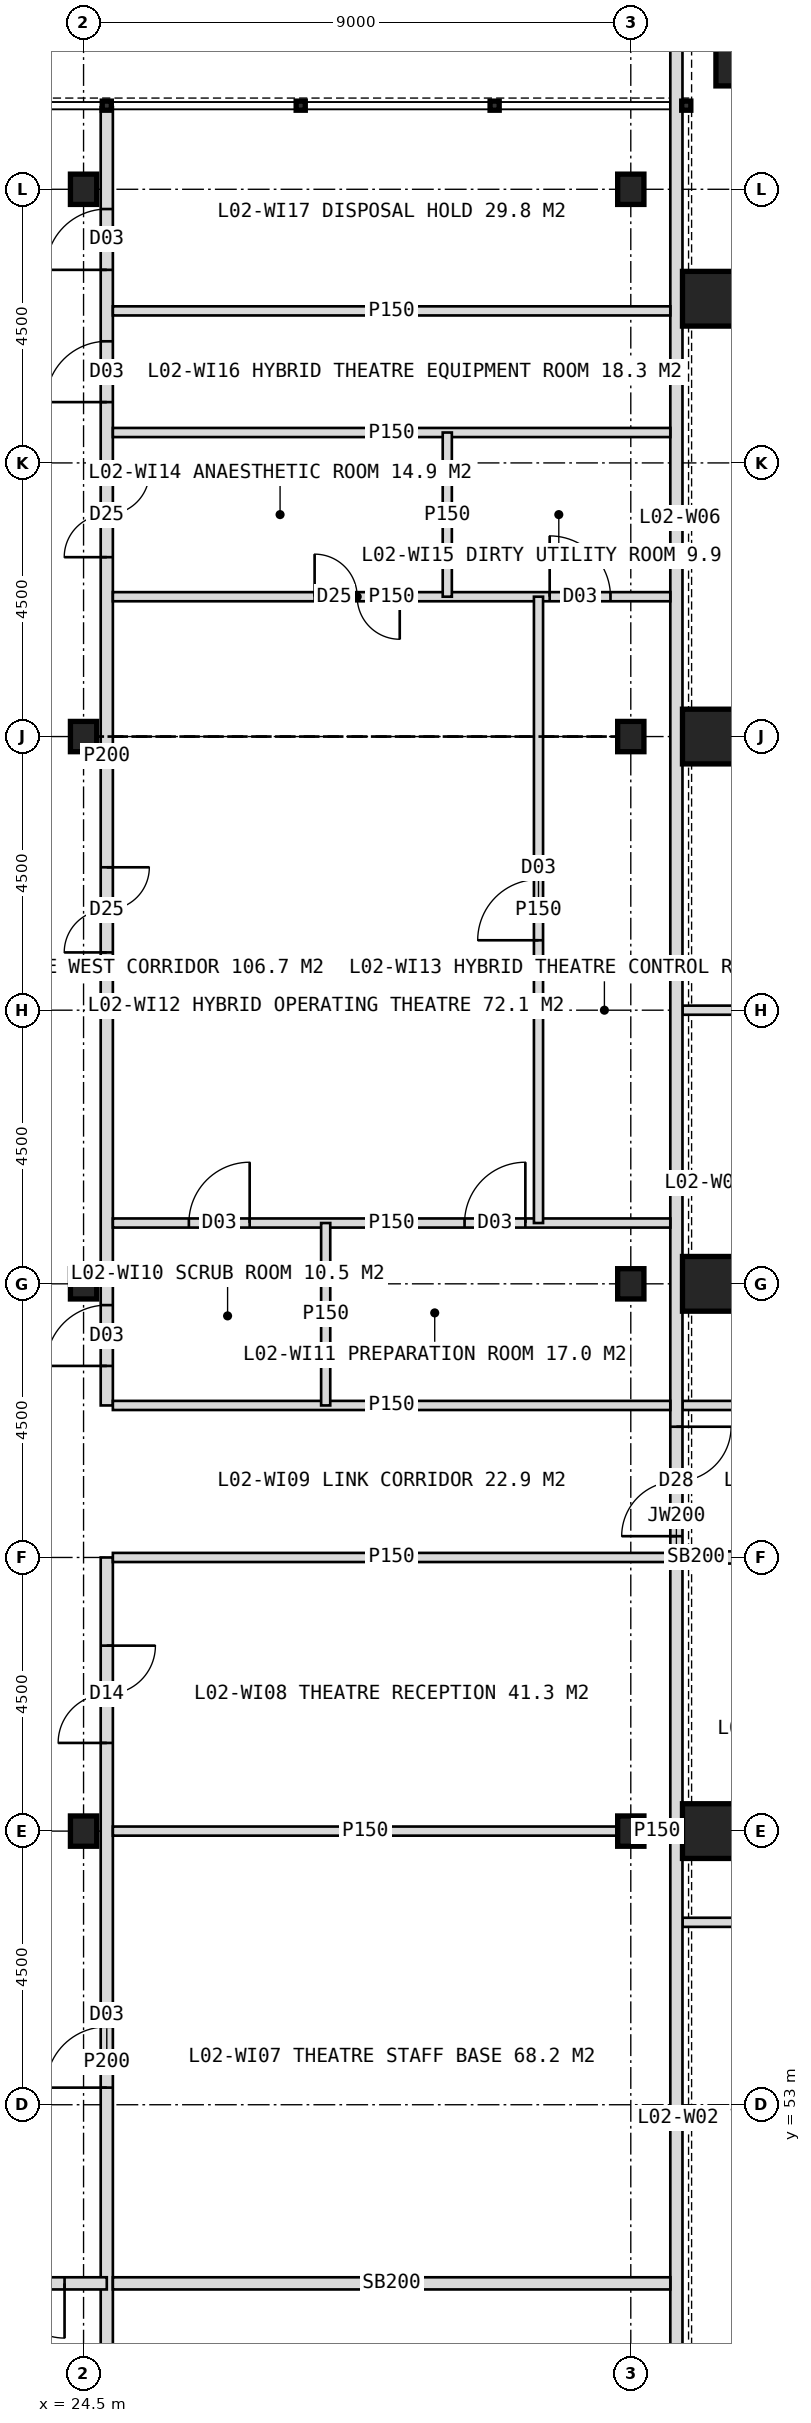
"""IFC4 building model, lengths in metres.
Left out: names, types, materials, properties, quantities, classifications, styles, units other than length and angle.
Written with IfcOpenShell. Run it as: python <this file> out.ifc"""

import sys

from ifc_helpers import new_model, si_unit, direction, frame, frame_2d, origin, origin_2d, place, context, subcontext, project, spatial, rectangle, hollow_rectangle, i_section, extrude, element, fill, save


model = new_model("IFC4")
c1 = context("Model", 3, precision=1e-05, world=origin(), true_north=direction((0.0, 1.0)))
c2 = subcontext(c1, "Body", "Model", "MODEL_VIEW")
j1 = project(units=[si_unit("LENGTHUNIT", "METRE"), si_unit("PLANEANGLEUNIT", "RADIAN")], contexts=[c1])
p1 = place(None, origin())
s1 = spatial("IfcSite", under=j1, at=p1, CompositionType="ELEMENT")
p2 = place(p1, origin())
s2 = spatial("IfcBuilding", under=s1, at=p2, CompositionType="ELEMENT")
p3 = place(p2, frame((0.0, 0.0, 11.0)))
s3 = spatial("IfcBuildingStorey", under=s2, at=p3, CompositionType="ELEMENT", Elevation=11.0)
for number, where, z_axis, x_axis in (
    (1, (34.8, 57.5, 0.0), (0.0, 0.0, 1.0), (1.0, 0.0, 0.0)),
    (2, (34.8, 66.5, 0.0), (0.0, 0.0, 1.0), (1.0, 0.0, 0.0)),
    (3, (34.8, 75.5, 0.0), (0.0, 0.0, 1.0), (1.0, 0.0, 0.0)),
    (4, (34.8, 82.7, 0.0), (0.0, 0.0, 1.0), (1.0, 0.0, 0.0)),
    (5, (35.35, 86.65, 0.0), (0.0, 0.0, 1.0), (1.0, 0.0, 0.0)),
):
    element("IfcColumn", number, at=place(p3, frame(where, z_axis=z_axis, x_axis=x_axis)), inside=s3, PredefinedType="COLUMN", context=c2, shape_type="SweptSolid", body=[
        extrude(hollow_rectangle(XDim=0.9, YDim=0.9, WallThickness=0.08, at=origin_2d()), origin(), (0.0, 0.0, 1.0), 5.5),
    ])
for number, where, z_axis, x_axis in (
    (6, (24.5, 57.5, 0.0), (0.0, 0.0, 1.0), (1.0, 0.0, 0.0)),
    (7, (24.5, 66.5, 0.0), (0.0, 0.0, 1.0), (1.0, 0.0, 0.0)),
    (8, (24.5, 75.5, 0.0), (0.0, 0.0, 1.0), (1.0, 0.0, 0.0)),
    (9, (24.5, 84.5, 0.0), (0.0, 0.0, 1.0), (1.0, 0.0, 0.0)),
    (10, (33.5, 57.5, 0.0), (0.0, 0.0, 1.0), (1.0, 0.0, 0.0)),
    (11, (33.5, 66.5, 0.0), (0.0, 0.0, 1.0), (1.0, 0.0, 0.0)),
    (12, (33.5, 75.5, 0.0), (0.0, 0.0, 1.0), (1.0, 0.0, 0.0)),
    (13, (33.5, 84.5, 0.0), (0.0, 0.0, 1.0), (1.0, 0.0, 0.0)),
):
    element("IfcColumn", number, at=place(p3, frame(where, z_axis=z_axis, x_axis=x_axis)), inside=s3, PredefinedType="COLUMN", context=c2, shape_type="SweptSolid", body=[
        extrude(i_section(OverallWidth=0.432, OverallDepth=0.498, WebThickness=0.056, FlangeThickness=0.089, FilletRadius=0.015, at=origin_2d()), origin(), (0.0, 0.0, 1.0), 5.5),
    ])
p4 = place(p3, frame((40.5, 56.0, 0.0), z_axis=(0.0, 0.0, 1.0), x_axis=(-1.0, 0.0, 0.0)))
e14 = element("IfcWall", 14, at=p4, inside=s3, PredefinedType="PARTITIONING", context=c2, shape_type="SweptSolid", body=[
    extrude(rectangle(XDim=6.15, YDim=0.15, at=frame_2d((3.075, 0.0))), origin(), (0.0, 0.0, 1.0), 5.2),
])
p5 = place(p3, frame((40.5, 62.0, 0.0), z_axis=(0.0, 0.0, 1.0), x_axis=(-1.0, 0.0, 0.0)))
e15 = element("IfcWall", 15, at=p5, inside=s3, PredefinedType="SOLIDWALL", context=c2, shape_type="SweptSolid", body=[
    extrude(rectangle(XDim=5.7, YDim=0.2, at=frame_2d((2.85, 0.0))), origin(), (0.0, 0.0, 1.0), 4.4),
])
p6 = place(p3, frame((34.8, 62.0, 0.0), z_axis=(0.0, 0.0, 1.0), x_axis=(-1.0, 0.0, 0.0)))
e16 = element("IfcWall", 16, at=p6, inside=s3, PredefinedType="SOLIDWALL", context=c2, shape_type="SweptSolid", body=[
    extrude(rectangle(XDim=0.45, YDim=0.2, at=frame_2d((0.225, 0.0))), origin(), (0.0, 0.0, 1.0), 5.2),
])
for number, where, z_axis, x_axis in (
    (17, (40.5, 64.5, 0.0), (0.0, 0.0, 1.0), (-1.0, 0.0, 0.0)),
    (18, (40.5, 71.0, 0.0), (0.0, 0.0, 1.0), (-1.0, 0.0, 0.0)),
):
    element("IfcWall", number, at=place(p3, frame(where, z_axis=z_axis, x_axis=x_axis)), inside=s3, PredefinedType="PARTITIONING", context=c2, shape_type="SweptSolid", body=[
        extrude(rectangle(XDim=6.15, YDim=0.15, at=frame_2d((3.075, 0.0))), origin(), (0.0, 0.0, 1.0), 5.2),
    ])
p7 = place(p3, frame((24.882, 45.4, 0.0), z_axis=(0.0, 0.0, 1.0), x_axis=(0.0, 1.0, 0.0)))
e19 = element("IfcWall", 19, at=p7, inside=s3, PredefinedType="PARTITIONING", context=c2, shape_type="SweptSolid", body=[
    extrude(rectangle(XDim=16.6, YDim=0.2, at=frame_2d((8.3, 0.0))), origin(), (0.0, 0.0, 1.0), 5.2),
])
p8 = place(p7, frame((1.181, 0.0, 0.0)))
e20 = element("IfcOpeningElement", 20, at=p8, cuts=e19, PredefinedType="OPENING", context=c2, shape_type="SweptSolid", body=[
    extrude(rectangle(XDim=1.6, YDim=2.2, at=frame_2d((0.8, 1.1))), frame((0.0, 0.11, 0.0), z_axis=(0.0, -1.0, 0.0), x_axis=(1.0, 0.0, 0.0)), (0.0, 0.0, 1.0), 0.22),
])
p9 = place(p7, frame((7.881, 0.0, 0.0)))
e21 = element("IfcOpeningElement", 21, at=p9, cuts=e19, PredefinedType="OPENING", context=c2, shape_type="SweptSolid", body=[
    extrude(rectangle(XDim=1.0, YDim=2.1, at=frame_2d((0.5, 1.05))), frame((0.0, 0.11, 0.0), z_axis=(0.0, -1.0, 0.0), x_axis=(1.0, 0.0, 0.0)), (0.0, 0.0, 1.0), 0.22),
])
p10 = place(p7, frame((13.55, 0.0, 0.0)))
e22 = element("IfcOpeningElement", 22, at=p10, cuts=e19, PredefinedType="OPENING", context=c2, shape_type="SweptSolid", body=[
    extrude(rectangle(XDim=1.6, YDim=2.2, at=frame_2d((0.8, 1.1))), frame((0.0, 0.11, 0.0), z_axis=(0.0, -1.0, 0.0), x_axis=(1.0, 0.0, 0.0)), (0.0, 0.0, 1.0), 0.22),
])
p11 = place(p3, frame((24.882, 64.5, 0.0), z_axis=(0.0, 0.0, 1.0), x_axis=(0.0, 1.0, 0.0)))
e23 = element("IfcWall", 23, at=p11, inside=s3, PredefinedType="PARTITIONING", context=c2, shape_type="SweptSolid", body=[
    extrude(rectangle(XDim=21.35, YDim=0.2, at=frame_2d((10.675, 0.0))), origin(), (0.0, 0.0, 1.0), 5.2),
])
p12 = place(p11, frame((0.65, 0.0, 0.0)))
e24 = element("IfcOpeningElement", 24, at=p12, cuts=e23, PredefinedType="OPENING", context=c2, shape_type="SweptSolid", body=[
    extrude(rectangle(XDim=1.0, YDim=2.1, at=frame_2d((0.5, 1.05))), frame((0.0, 0.11, 0.0), z_axis=(0.0, -1.0, 0.0), x_axis=(1.0, 0.0, 0.0)), (0.0, 0.0, 1.0), 0.22),
])
p13 = place(p11, frame((7.45, 0.0, 0.0)))
e25 = element("IfcOpeningElement", 25, at=p13, cuts=e23, PredefinedType="OPENING", context=c2, shape_type="SweptSolid", body=[
    extrude(rectangle(XDim=1.4, YDim=2.2, at=frame_2d((0.7, 1.1))), frame((0.0, 0.11, 0.0), z_axis=(0.0, -1.0, 0.0), x_axis=(1.0, 0.0, 0.0)), (0.0, 0.0, 1.0), 0.22),
])
p14 = place(p11, frame((13.95, 0.0, 0.0)))
e26 = element("IfcOpeningElement", 26, at=p14, cuts=e23, PredefinedType="OPENING", context=c2, shape_type="SweptSolid", body=[
    extrude(rectangle(XDim=1.4, YDim=2.2, at=frame_2d((0.7, 1.1))), frame((0.0, 0.11, 0.0), z_axis=(0.0, -1.0, 0.0), x_axis=(1.0, 0.0, 0.0)), (0.0, 0.0, 1.0), 0.22),
])
p15 = place(p11, frame((16.5, 0.0, 0.0)))
e27 = element("IfcOpeningElement", 27, at=p15, cuts=e23, PredefinedType="OPENING", context=c2, shape_type="SweptSolid", body=[
    extrude(rectangle(XDim=1.0, YDim=2.1, at=frame_2d((0.5, 1.05))), frame((0.0, 0.11, 0.0), z_axis=(0.0, -1.0, 0.0), x_axis=(1.0, 0.0, 0.0)), (0.0, 0.0, 1.0), 0.22),
])
p16 = place(p11, frame((18.675, 0.0, 0.0)))
e28 = element("IfcOpeningElement", 28, at=p16, cuts=e23, PredefinedType="OPENING", context=c2, shape_type="SweptSolid", body=[
    extrude(rectangle(XDim=1.0, YDim=2.1, at=frame_2d((0.5, 1.05))), frame((0.0, 0.11, 0.0), z_axis=(0.0, -1.0, 0.0), x_axis=(1.0, 0.0, 0.0)), (0.0, 0.0, 1.0), 0.22),
])
p17 = place(p3, frame((21.693, 50.062, 0.0), z_axis=(0.0, 0.0, 1.0), x_axis=(1.0, 0.0, 0.0)))
e29 = element("IfcWall", 29, at=p17, inside=s3, PredefinedType="SOLIDWALL", context=c2, shape_type="SweptSolid", body=[
    extrude(rectangle(XDim=3.189, YDim=0.2, at=frame_2d((1.594, 0.0))), origin(), (0.0, 0.0, 1.0), 5.2),
])
p18 = place(p17, frame((0.695, 0.0, 0.0)))
e30 = element("IfcOpeningElement", 30, at=p18, cuts=e29, PredefinedType="OPENING", context=c2, shape_type="SweptSolid", body=[
    extrude(rectangle(XDim=1.8, YDim=2.2, at=frame_2d((0.9, 1.1))), frame((0.0, 0.11, 0.0), z_axis=(0.0, -1.0, 0.0), x_axis=(1.0, 0.0, 0.0)), (0.0, 0.0, 1.0), 0.22),
])
p19 = place(p3, frame((34.25, 36.8, 0.0), z_axis=(0.0, 0.0, 1.0), x_axis=(0.0, 1.0, 0.0)))
e31 = element("IfcWall", 31, at=p19, inside=s3, PredefinedType="SOLIDWALL", context=c2, shape_type="SweptSolid", body=[
    extrude(rectangle(XDim=50.4, YDim=0.2, at=frame_2d((25.2, 0.0))), origin(), (0.0, 0.0, 1.0), 5.2),
])
p20 = place(p19, frame((6.25, 0.0, 0.0)))
e32 = element("IfcOpeningElement", 32, at=p20, cuts=e31, PredefinedType="OPENING", context=c2, shape_type="SweptSolid", body=[
    extrude(rectangle(XDim=1.8, YDim=2.2, at=frame_2d((0.9, 1.1))), frame((0.0, 0.11, 0.0), z_axis=(0.0, -1.0, 0.0), x_axis=(1.0, 0.0, 0.0)), (0.0, 0.0, 1.0), 0.22),
])
p21 = place(p19, frame((25.55, 0.0, 0.0)))
e33 = element("IfcOpeningElement", 33, at=p21, cuts=e31, PredefinedType="OPENING", context=c2, shape_type="SweptSolid", body=[
    extrude(rectangle(XDim=1.8, YDim=2.2, at=frame_2d((0.9, 1.1))), frame((0.0, 0.11, 0.0), z_axis=(0.0, -1.0, 0.0), x_axis=(1.0, 0.0, 0.0)), (0.0, 0.0, 1.0), 0.22),
])
p22 = place(p3, frame((24.982, 50.062, 0.0), z_axis=(0.0, 0.0, 1.0), x_axis=(1.0, 0.0, 0.0)))
e34 = element("IfcWall", 34, at=p22, inside=s3, PredefinedType="SOLIDWALL", context=c2, shape_type="SweptSolid", body=[
    extrude(rectangle(XDim=9.168, YDim=0.2, at=frame_2d((4.584, 0.0))), origin(), (0.0, 0.0, 1.0), 5.2),
])
p23 = place(p3, frame((24.982, 57.5, 0.0), z_axis=(0.0, 0.0, 1.0), x_axis=(1.0, 0.0, 0.0)))
e35 = element("IfcWall", 35, at=p23, inside=s3, PredefinedType="PARTITIONING", context=c2, shape_type="SweptSolid", body=[
    extrude(rectangle(XDim=8.302, YDim=0.15, at=frame_2d((4.151, 0.0))), origin(), (0.0, 0.0, 1.0), 4.4),
])
p24 = place(p3, frame((33.716, 57.5, 0.0), z_axis=(0.0, 0.0, 1.0), x_axis=(1.0, 0.0, 0.0)))
e36 = element("IfcWall", 36, at=p24, inside=s3, PredefinedType="PARTITIONING", context=c2, shape_type="SweptSolid", body=[
    extrude(rectangle(XDim=0.434, YDim=0.15, at=frame_2d((0.217, 0.0))), origin(), (0.0, 0.0, 1.0), 5.2),
])
for number, where, z_axis, x_axis in (
    (37, (24.982, 62.0, 0.0), (0.0, 0.0, 1.0), (1.0, 0.0, 0.0)),
    (38, (24.982, 64.5, 0.0), (0.0, 0.0, 1.0), (1.0, 0.0, 0.0)),
):
    element("IfcWall", number, at=place(p3, frame(where, z_axis=z_axis, x_axis=x_axis)), inside=s3, PredefinedType="PARTITIONING", context=c2, shape_type="SweptSolid", body=[
        extrude(rectangle(XDim=9.168, YDim=0.15, at=frame_2d((4.584, 0.0))), origin(), (0.0, 0.0, 1.0), 5.2),
    ])
p25 = place(p3, frame((24.982, 67.5, 0.0), z_axis=(0.0, 0.0, 1.0), x_axis=(1.0, 0.0, 0.0)))
e39 = element("IfcWall", 39, at=p25, inside=s3, PredefinedType="PARTITIONING", context=c2, shape_type="SweptSolid", body=[
    extrude(rectangle(XDim=9.168, YDim=0.15, at=frame_2d((4.584, 0.0))), origin(), (0.0, 0.0, 1.0), 5.2),
])
p26 = place(p25, frame((1.25, 0.0, 0.0)))
e40 = element("IfcOpeningElement", 40, at=p26, cuts=e39, PredefinedType="OPENING", context=c2, shape_type="SweptSolid", body=[
    extrude(rectangle(XDim=1.0, YDim=2.1, at=frame_2d((0.5, 1.05))), frame((0.0, 0.085, 0.0), z_axis=(0.0, -1.0, 0.0), x_axis=(1.0, 0.0, 0.0)), (0.0, 0.0, 1.0), 0.17),
])
p27 = place(p25, frame((5.784, 0.0, 0.0)))
e41 = element("IfcOpeningElement", 41, at=p27, cuts=e39, PredefinedType="OPENING", context=c2, shape_type="SweptSolid", body=[
    extrude(rectangle(XDim=1.0, YDim=2.1, at=frame_2d((0.5, 1.05))), frame((0.0, 0.085, 0.0), z_axis=(0.0, -1.0, 0.0), x_axis=(1.0, 0.0, 0.0)), (0.0, 0.0, 1.0), 0.17),
])
p28 = place(p3, frame((24.982, 77.8, 0.0), z_axis=(0.0, 0.0, 1.0), x_axis=(1.0, 0.0, 0.0)))
e42 = element("IfcWall", 42, at=p28, inside=s3, PredefinedType="PARTITIONING", context=c2, shape_type="SweptSolid", body=[
    extrude(rectangle(XDim=9.168, YDim=0.15, at=frame_2d((4.584, 0.0))), origin(), (0.0, 0.0, 1.0), 5.2),
])
p29 = place(p28, frame((3.318, 0.0, 0.0)))
e43 = element("IfcOpeningElement", 43, at=p29, cuts=e42, PredefinedType="OPENING", context=c2, shape_type="SweptSolid", body=[
    extrude(rectangle(XDim=1.4, YDim=2.2, at=frame_2d((0.7, 1.1))), frame((0.0, 0.085, 0.0), z_axis=(0.0, -1.0, 0.0), x_axis=(1.0, 0.0, 0.0)), (0.0, 0.0, 1.0), 0.17),
])
p30 = place(p28, frame((7.184, 0.0, 0.0)))
e44 = element("IfcOpeningElement", 44, at=p30, cuts=e42, PredefinedType="OPENING", context=c2, shape_type="SweptSolid", body=[
    extrude(rectangle(XDim=1.0, YDim=2.1, at=frame_2d((0.5, 1.05))), frame((0.0, 0.085, 0.0), z_axis=(0.0, -1.0, 0.0), x_axis=(1.0, 0.0, 0.0)), (0.0, 0.0, 1.0), 0.17),
])
for number, where, z_axis, x_axis in (
    (45, (24.982, 80.5, 0.0), (0.0, 0.0, 1.0), (1.0, 0.0, 0.0)),
    (46, (24.982, 82.5, 0.0), (0.0, 0.0, 1.0), (1.0, 0.0, 0.0)),
):
    element("IfcWall", number, at=place(p3, frame(where, z_axis=z_axis, x_axis=x_axis)), inside=s3, PredefinedType="PARTITIONING", context=c2, shape_type="SweptSolid", body=[
        extrude(rectangle(XDim=9.168, YDim=0.15, at=frame_2d((4.584, 0.0))), origin(), (0.0, 0.0, 1.0), 5.2),
    ])
p31 = place(p3, frame((28.482, 64.5, 0.0), z_axis=(0.0, 0.0, 1.0), x_axis=(0.0, 1.0, 0.0)))
e47 = element("IfcWall", 47, at=p31, inside=s3, PredefinedType="PARTITIONING", context=c2, shape_type="SweptSolid", body=[
    extrude(rectangle(XDim=3.0, YDim=0.15, at=frame_2d((1.5, 0.0))), origin(), (0.0, 0.0, 1.0), 5.2),
])
p32 = place(p3, frame((30.482, 77.8, 0.0), z_axis=(0.0, 0.0, 1.0), x_axis=(0.0, 1.0, 0.0)))
e48 = element("IfcWall", 48, at=p32, inside=s3, PredefinedType="PARTITIONING", context=c2, shape_type="SweptSolid", body=[
    extrude(rectangle(XDim=2.7, YDim=0.15, at=frame_2d((1.35, 0.0))), origin(), (0.0, 0.0, 1.0), 5.2),
])
p33 = place(p3, frame((31.982, 67.5, 0.0), z_axis=(0.0, 0.0, 1.0), x_axis=(0.0, 1.0, 0.0)))
e49 = element("IfcWall", 49, at=p33, inside=s3, PredefinedType="PARTITIONING", context=c2, shape_type="SweptSolid", body=[
    extrude(rectangle(XDim=10.3, YDim=0.15, at=frame_2d((5.15, 0.0))), origin(), (0.0, 0.0, 1.0), 5.2),
])
p34 = place(p33, frame((4.65, 0.0, 0.0)))
e50 = element("IfcOpeningElement", 50, at=p34, cuts=e49, PredefinedType="OPENING", context=c2, shape_type="SweptSolid", body=[
    extrude(rectangle(XDim=1.0, YDim=2.1, at=frame_2d((0.5, 1.05))), frame((0.0, 0.085, 0.0), z_axis=(0.0, -1.0, 0.0), x_axis=(1.0, 0.0, 0.0)), (0.0, 0.0, 1.0), 0.17),
])
p35 = place(p18, origin())
e51 = element("IfcDoor", 51, at=p35, inside=s3, OperationType="DOUBLE_DOOR_DOUBLE_SWING", PredefinedType="DOOR", context=c2, shape_type="SweptSolid", body=[
    extrude(rectangle(XDim=1.8, YDim=2.2, at=frame_2d((0.9, 1.1))), frame((0.0, 0.025, 0.0), z_axis=(0.0, -1.0, 0.0), x_axis=(1.0, 0.0, 0.0)), (0.0, 0.0, 1.0), 0.05),
])
fill(e30, e51)
p36 = place(p21, origin())
e52 = element("IfcDoor", 52, at=p36, inside=s3, OperationType="DOUBLE_DOOR_SINGLE_SWING", PredefinedType="DOOR", context=c2, shape_type="SweptSolid", body=[
    extrude(rectangle(XDim=1.8, YDim=2.2, at=frame_2d((0.9, 1.1))), frame((0.0, 0.025, 0.0), z_axis=(0.0, -1.0, 0.0), x_axis=(1.0, 0.0, 0.0)), (0.0, 0.0, 1.0), 0.05),
])
fill(e33, e52)
p37 = place(p9, origin())
e53 = element("IfcDoor", 53, at=p37, inside=s3, OperationType="SINGLE_SWING_LEFT", PredefinedType="DOOR", context=c2, shape_type="SweptSolid", body=[
    extrude(rectangle(XDim=1.0, YDim=2.1, at=frame_2d((0.5, 1.05))), frame((0.0, 0.025, 0.0), z_axis=(0.0, -1.0, 0.0), x_axis=(1.0, 0.0, 0.0)), (0.0, 0.0, 1.0), 0.05),
])
fill(e21, e53)
p38 = place(p10, origin())
e54 = element("IfcDoor", 54, at=p38, inside=s3, OperationType="DOUBLE_DOOR_DOUBLE_SWING", PredefinedType="DOOR", context=c2, shape_type="SweptSolid", body=[
    extrude(rectangle(XDim=1.6, YDim=2.2, at=frame_2d((0.8, 1.1))), frame((0.0, 0.025, 0.0), z_axis=(0.0, -1.0, 0.0), x_axis=(1.0, 0.0, 0.0)), (0.0, 0.0, 1.0), 0.05),
])
fill(e22, e54)
p39 = place(p12, origin())
e55 = element("IfcDoor", 55, at=p39, inside=s3, OperationType="SINGLE_SWING_LEFT", PredefinedType="DOOR", context=c2, shape_type="SweptSolid", body=[
    extrude(rectangle(XDim=1.0, YDim=2.1, at=frame_2d((0.5, 1.05))), frame((0.0, 0.025, 0.0), z_axis=(0.0, -1.0, 0.0), x_axis=(1.0, 0.0, 0.0)), (0.0, 0.0, 1.0), 0.05),
])
fill(e24, e55)
p40 = place(p26, origin())
e56 = element("IfcDoor", 56, at=p40, inside=s3, OperationType="SINGLE_SWING_RIGHT", PredefinedType="DOOR", context=c2, shape_type="SweptSolid", body=[
    extrude(rectangle(XDim=1.0, YDim=2.1, at=frame_2d((0.5, 1.05))), frame((0.0, 0.025, 0.0), z_axis=(0.0, -1.0, 0.0), x_axis=(1.0, 0.0, 0.0)), (0.0, 0.0, 1.0), 0.05),
])
fill(e40, e56)
p41 = place(p27, origin())
e57 = element("IfcDoor", 57, at=p41, inside=s3, OperationType="SINGLE_SWING_RIGHT", PredefinedType="DOOR", context=c2, shape_type="SweptSolid", body=[
    extrude(rectangle(XDim=1.0, YDim=2.1, at=frame_2d((0.5, 1.05))), frame((0.0, 0.025, 0.0), z_axis=(0.0, -1.0, 0.0), x_axis=(1.0, 0.0, 0.0)), (0.0, 0.0, 1.0), 0.05),
])
fill(e41, e57)
p42 = place(p13, origin())
e58 = element("IfcDoor", 58, at=p42, inside=s3, OperationType="DOUBLE_DOOR_SINGLE_SWING", PredefinedType="DOOR", context=c2, shape_type="SweptSolid", body=[
    extrude(rectangle(XDim=1.4, YDim=2.2, at=frame_2d((0.7, 1.1))), frame((0.0, 0.025, 0.0), z_axis=(0.0, -1.0, 0.0), x_axis=(1.0, 0.0, 0.0)), (0.0, 0.0, 1.0), 0.05),
])
fill(e25, e58)
p43 = place(p34, origin())
e59 = element("IfcDoor", 59, at=p43, inside=s3, OperationType="SINGLE_SWING_LEFT", PredefinedType="DOOR", context=c2, shape_type="SweptSolid", body=[
    extrude(rectangle(XDim=1.0, YDim=2.1, at=frame_2d((0.5, 1.05))), frame((0.0, 0.025, 0.0), z_axis=(0.0, -1.0, 0.0), x_axis=(1.0, 0.0, 0.0)), (0.0, 0.0, 1.0), 0.05),
])
fill(e50, e59)
p44 = place(p14, origin())
e60 = element("IfcDoor", 60, at=p44, inside=s3, OperationType="DOUBLE_DOOR_SINGLE_SWING", PredefinedType="DOOR", context=c2, shape_type="SweptSolid", body=[
    extrude(rectangle(XDim=1.4, YDim=2.2, at=frame_2d((0.7, 1.1))), frame((0.0, 0.025, 0.0), z_axis=(0.0, -1.0, 0.0), x_axis=(1.0, 0.0, 0.0)), (0.0, 0.0, 1.0), 0.05),
])
fill(e26, e60)
p45 = place(p29, origin())
e61 = element("IfcDoor", 61, at=p45, inside=s3, OperationType="DOUBLE_DOOR_SINGLE_SWING", PredefinedType="DOOR", context=c2, shape_type="SweptSolid", body=[
    extrude(rectangle(XDim=1.4, YDim=2.2, at=frame_2d((0.7, 1.1))), frame((0.0, 0.025, 0.0), z_axis=(0.0, -1.0, 0.0), x_axis=(1.0, 0.0, 0.0)), (0.0, 0.0, 1.0), 0.05),
])
fill(e43, e61)
p46 = place(p30, origin())
e62 = element("IfcDoor", 62, at=p46, inside=s3, OperationType="SINGLE_SWING_LEFT", PredefinedType="DOOR", context=c2, shape_type="SweptSolid", body=[
    extrude(rectangle(XDim=1.0, YDim=2.1, at=frame_2d((0.5, 1.05))), frame((0.0, 0.025, 0.0), z_axis=(0.0, -1.0, 0.0), x_axis=(1.0, 0.0, 0.0)), (0.0, 0.0, 1.0), 0.05),
])
fill(e44, e62)
p47 = place(p15, origin())
e63 = element("IfcDoor", 63, at=p47, inside=s3, OperationType="SINGLE_SWING_LEFT", PredefinedType="DOOR", context=c2, shape_type="SweptSolid", body=[
    extrude(rectangle(XDim=1.0, YDim=2.1, at=frame_2d((0.5, 1.05))), frame((0.0, 0.025, 0.0), z_axis=(0.0, -1.0, 0.0), x_axis=(1.0, 0.0, 0.0)), (0.0, 0.0, 1.0), 0.05),
])
fill(e27, e63)
p48 = place(p16, origin())
e64 = element("IfcDoor", 64, at=p48, inside=s3, OperationType="SINGLE_SWING_LEFT", PredefinedType="DOOR", context=c2, shape_type="SweptSolid", body=[
    extrude(rectangle(XDim=1.0, YDim=2.1, at=frame_2d((0.5, 1.05))), frame((0.0, 0.025, 0.0), z_axis=(0.0, -1.0, 0.0), x_axis=(1.0, 0.0, 0.0)), (0.0, 0.0, 1.0), 0.05),
])
fill(e28, e64)
save(model, sys.argv[1])
